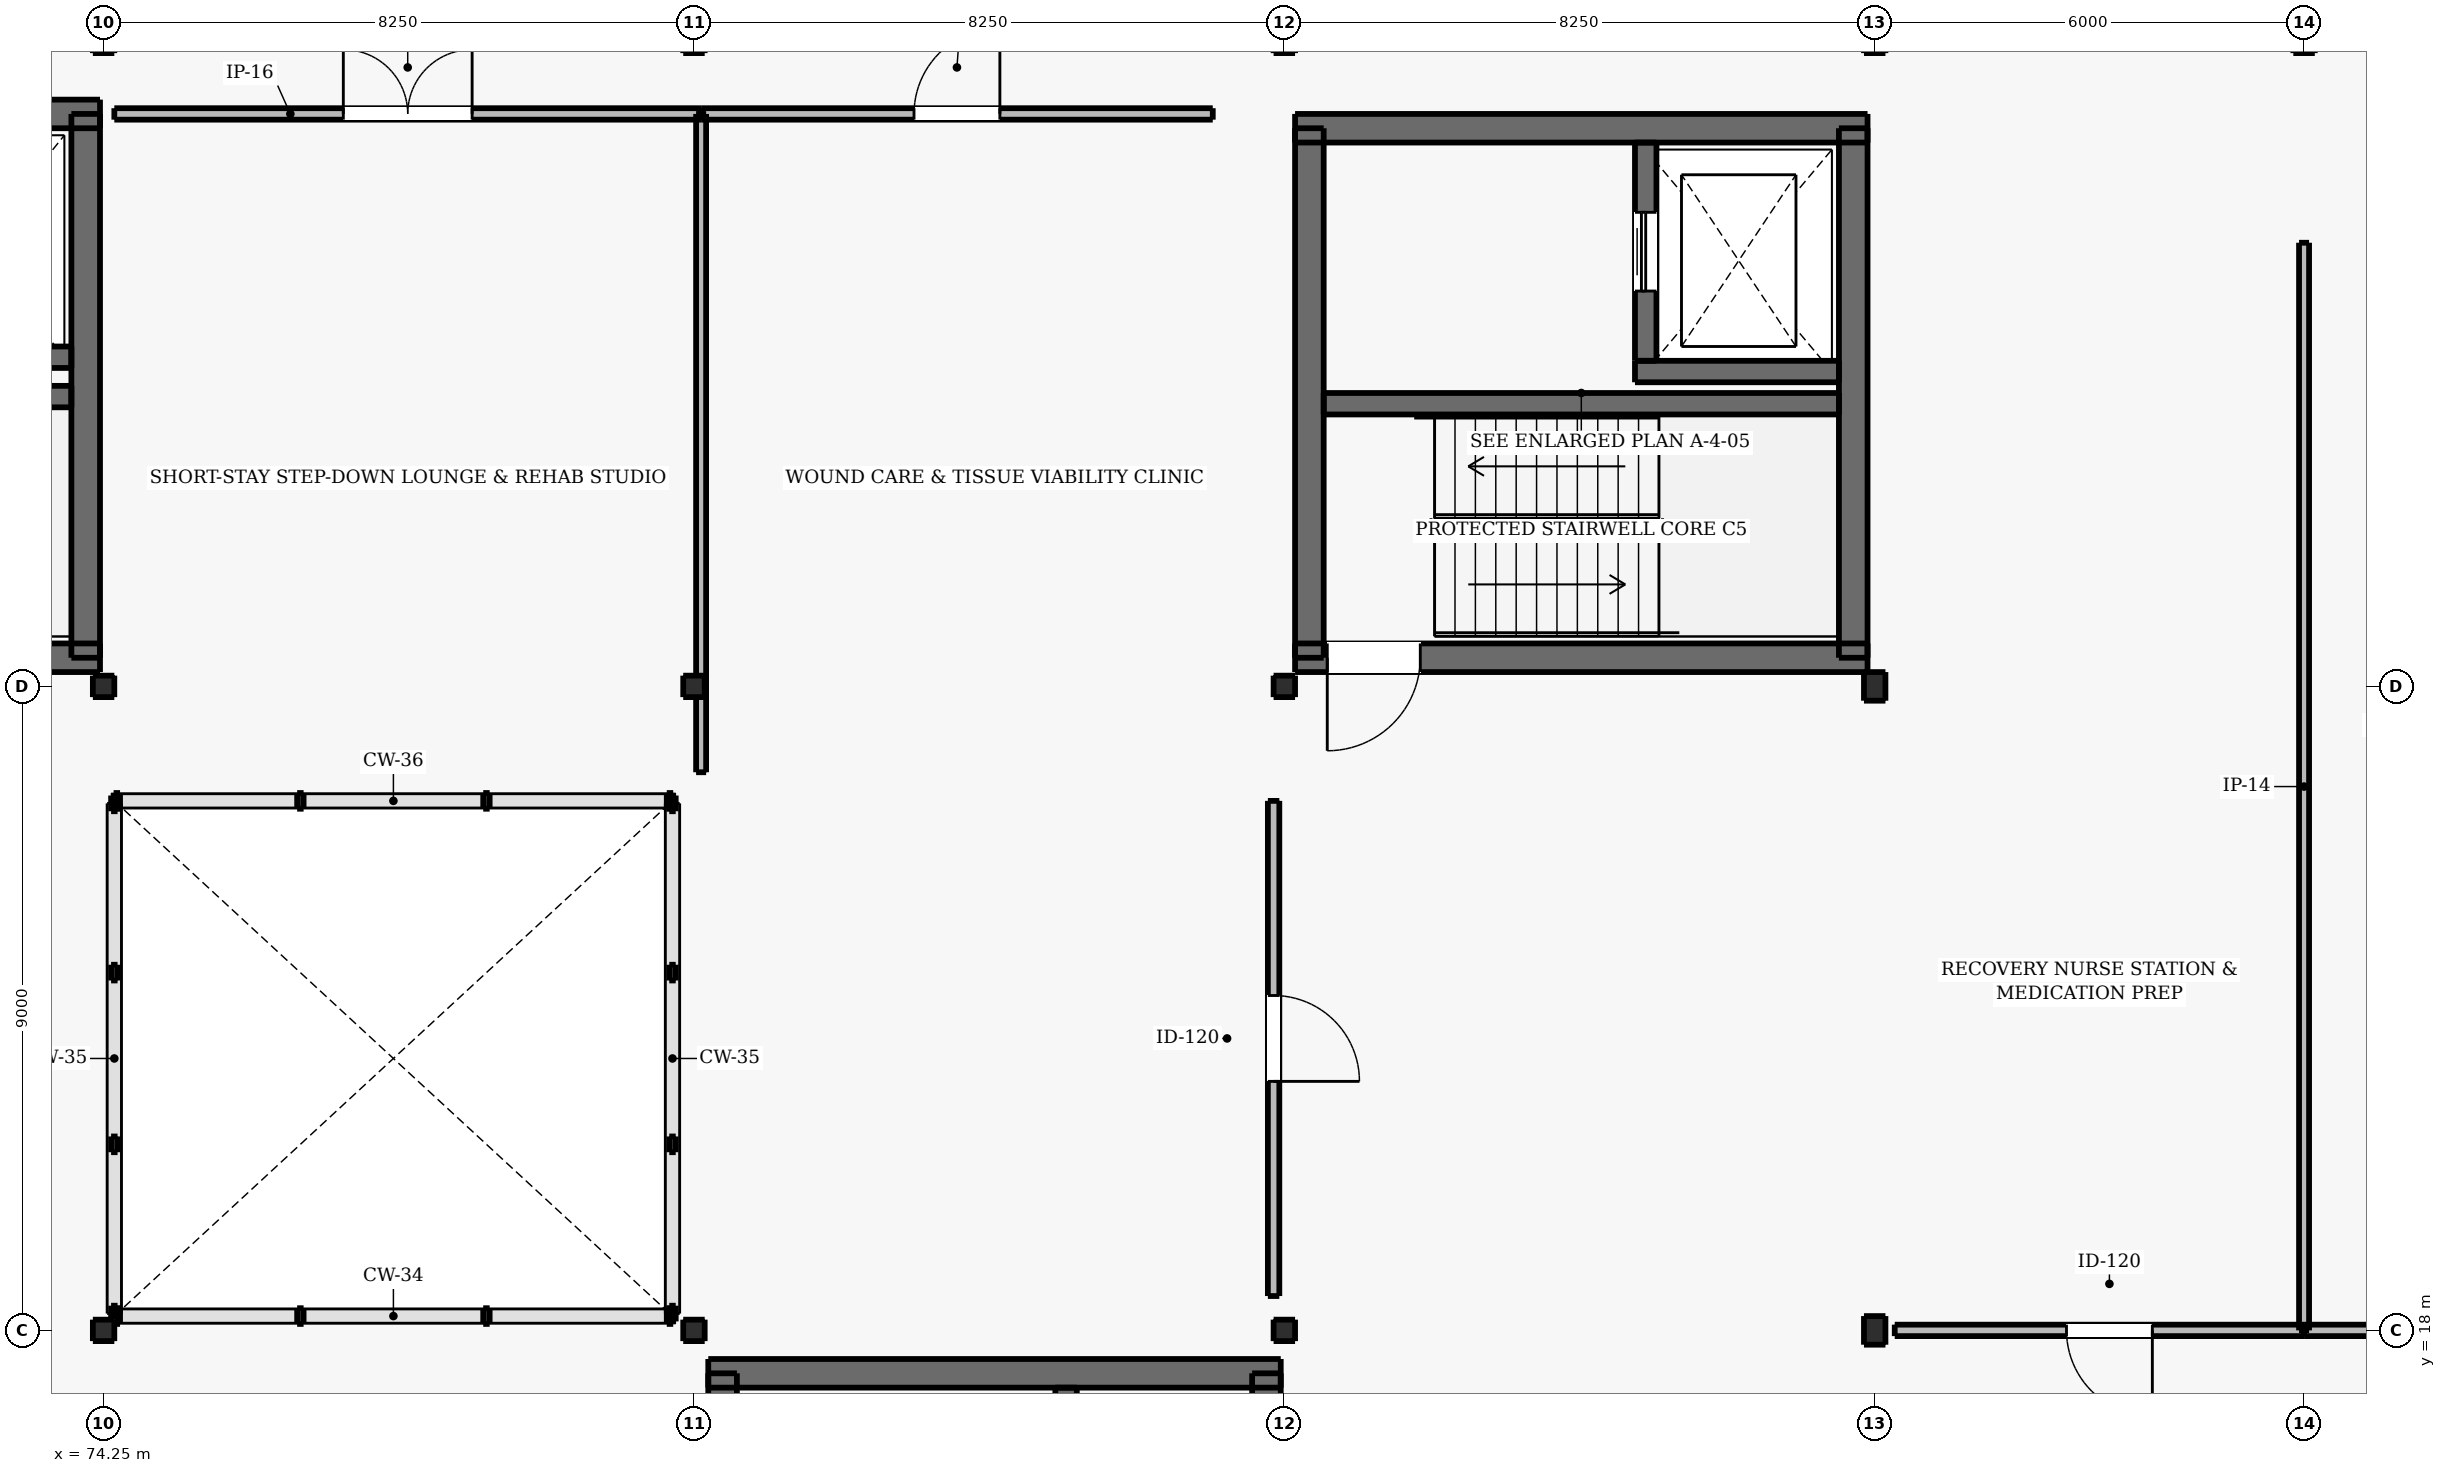
"""IFC4 building model, lengths in metres.
Left out: names, types, materials, properties, quantities, classifications, styles, units other than length and angle.
Written with IfcOpenShell. Run it as: python <this file> out.ifc"""

import sys

from ifc_helpers import new_model, si_unit, direction, frame, frame_2d, origin, origin_2d, place, context, subcontext, project, spatial, rectangle, i_section, extrude, element, fill, save


model = new_model("IFC4")
c1 = context("Model", 3, precision=1e-05, world=origin(), true_north=direction((0.0, 1.0)))
c2 = subcontext(c1, "Body", "Model", "MODEL_VIEW")
j1 = project(units=[si_unit("LENGTHUNIT", "METRE"), si_unit("PLANEANGLEUNIT", "RADIAN")], contexts=[c1])
p1 = place(None, origin())
s1 = spatial("IfcSite", under=j1, at=p1, CompositionType="ELEMENT")
p2 = place(p1, origin())
s2 = spatial("IfcBuilding", under=s1, at=p2, CompositionType="ELEMENT")
p3 = place(p2, frame((0.0, 0.0, 18.0)))
s3 = spatial("IfcBuildingStorey", under=s2, at=p3, CompositionType="ELEMENT", Elevation=18.0)
for number, where, z_axis, x_axis in (
    (1, (74.25, 18.0, 0.0), (0.0, 0.0, 1.0), (1.0, 0.0, 0.0)),
    (2, (74.25, 27.0, 0.0), (0.0, 0.0, 1.0), (1.0, 0.0, 0.0)),
    (3, (74.25, 36.0, 0.0), (0.0, 0.0, 1.0), (1.0, 0.0, 0.0)),
    (4, (82.5, 18.0, 0.0), (0.0, 0.0, 1.0), (1.0, 0.0, 0.0)),
    (5, (82.5, 27.0, 0.0), (0.0, 0.0, 1.0), (1.0, 0.0, 0.0)),
    (6, (82.5, 36.0, 0.0), (0.0, 0.0, 1.0), (1.0, 0.0, 0.0)),
    (7, (90.75, 18.0, 0.0), (0.0, 0.0, 1.0), (1.0, 0.0, 0.0)),
    (8, (90.75, 27.0, 0.0), (0.0, 0.0, 1.0), (1.0, 0.0, 0.0)),
    (9, (90.75, 36.0, 0.0), (0.0, 0.0, 1.0), (1.0, 0.0, 0.0)),
):
    element("IfcColumn", number, at=place(p3, frame(where, z_axis=z_axis, x_axis=x_axis)), inside=s3, PredefinedType="COLUMN", context=c2, shape_type="SweptSolid", body=[
        extrude(i_section(OverallWidth=0.3, OverallDepth=0.3, WebThickness=0.011, FlangeThickness=0.019, FilletRadius=0.027, at=origin_2d()), origin(), (0.0, 0.0, 1.0), 4.2),
    ])
for number, where, z_axis, x_axis in (
    (10, (99.0, 18.0, 0.0), (0.0, 0.0, 1.0), (1.0, 0.0, 0.0)),
    (11, (99.0, 27.0, 0.0), (0.0, 0.0, 1.0), (1.0, 0.0, 0.0)),
):
    element("IfcColumn", number, at=place(p3, frame(where, z_axis=z_axis, x_axis=x_axis)), inside=s3, PredefinedType="COLUMN", context=c2, shape_type="SweptSolid", body=[
        extrude(i_section(OverallWidth=0.3, OverallDepth=0.4, WebThickness=0.013, FlangeThickness=0.024, FilletRadius=0.027, at=origin_2d()), origin(), (0.0, 0.0, 1.0), 4.2),
    ])
for number, where, z_axis, x_axis in (
    (12, (99.0, 36.0, 0.0), (0.0, 0.0, 1.0), (1.0, 0.0, 0.0)),
    (13, (105.0, 36.0, 0.0), (0.0, 0.0, 1.0), (1.0, 0.0, 0.0)),
):
    element("IfcColumn", number, at=place(p3, frame(where, z_axis=z_axis, x_axis=x_axis)), inside=s3, PredefinedType="COLUMN", context=c2, shape_type="SweptSolid", body=[
        extrude(i_section(OverallWidth=0.3, OverallDepth=0.3, WebThickness=0.011, FlangeThickness=0.019, FilletRadius=0.027, at=origin_2d()), origin(), (0.0, 0.0, 1.0), 4.2),
    ])
p4 = place(p3, frame((66.2, 27.4, 0.0), z_axis=(0.0, 0.0, 1.0), x_axis=(1.0, 0.0, 0.0)))
e14 = element("IfcWall", 14, at=p4, inside=s3, PredefinedType="SHEAR", context=c2, shape_type="SweptSolid", body=[
    extrude(rectangle(XDim=8.0, YDim=0.4, at=frame_2d((4.0, 0.0))), origin(), (0.0, 0.0, 1.0), 4.2),
])
p5 = place(p4, frame((0.45, 0.0, 0.0)))
e15 = element("IfcOpeningElement", 15, at=p5, cuts=e14, PredefinedType="OPENING", context=c2, shape_type="SweptSolid", body=[
    extrude(rectangle(XDim=1.3, YDim=2.15, at=frame_2d((0.65, 1.075))), frame((0.0, 0.21, 0.0), z_axis=(0.0, -1.0, 0.0), x_axis=(1.0, 0.0, 0.0)), (0.0, 0.0, 1.0), 0.42),
])
p6 = place(p3, frame((66.2, 35.0, 0.0), z_axis=(0.0, 0.0, 1.0), x_axis=(1.0, 0.0, 0.0)))
e16 = element("IfcWall", 16, at=p6, inside=s3, PredefinedType="SHEAR", context=c2, shape_type="SweptSolid", body=[
    extrude(rectangle(XDim=8.0, YDim=0.4, at=frame_2d((4.0, 0.0))), origin(), (0.0, 0.0, 1.0), 4.2),
])
p7 = place(p3, frame((74.0, 27.4, 0.0), z_axis=(0.0, 0.0, 1.0), x_axis=(0.0, 1.0, 0.0)))
e17 = element("IfcWall", 17, at=p7, inside=s3, PredefinedType="SHEAR", context=c2, shape_type="SweptSolid", body=[
    extrude(rectangle(XDim=7.6, YDim=0.4, at=frame_2d((3.8, 0.0))), origin(), (0.0, 0.0, 1.0), 4.2),
])
p8 = place(p3, frame((66.6, 31.05, 0.0), z_axis=(0.0, 0.0, 1.0), x_axis=(1.0, 0.0, 0.0)))
e18 = element("IfcWall", 18, at=p8, inside=s3, PredefinedType="SHEAR", context=c2, shape_type="SweptSolid", body=[
    extrude(rectangle(XDim=7.2, YDim=0.3, at=frame_2d((3.6, 0.0))), origin(), (0.0, 0.0, 1.0), 4.2),
])
p9 = place(p3, frame((71.05, 31.6, 0.0), z_axis=(0.0, 0.0, 1.0), x_axis=(1.0, 0.0, 0.0)))
e19 = element("IfcWall", 19, at=p9, inside=s3, PredefinedType="SHEAR", context=c2, shape_type="SweptSolid", body=[
    extrude(rectangle(XDim=2.75, YDim=0.3, at=frame_2d((1.375, 0.0))), origin(), (0.0, 0.0, 1.0), 4.2),
])
p10 = place(p3, frame((82.7, 17.4, 0.0), z_axis=(0.0, 0.0, 1.0), x_axis=(1.0, 0.0, 0.0)))
e20 = element("IfcWall", 20, at=p10, inside=s3, PredefinedType="SHEAR", context=c2, shape_type="SweptSolid", body=[
    extrude(rectangle(XDim=8.0, YDim=0.4, at=frame_2d((4.0, 0.0))), origin(), (0.0, 0.0, 1.0), 4.2),
])
p11 = place(p3, frame((82.9, 9.8, 0.0), z_axis=(0.0, 0.0, 1.0), x_axis=(0.0, 1.0, 0.0)))
e21 = element("IfcWall", 21, at=p11, inside=s3, PredefinedType="SHEAR", context=c2, shape_type="SweptSolid", body=[
    extrude(rectangle(XDim=7.6, YDim=0.4, at=frame_2d((3.8, 0.0))), origin(), (0.0, 0.0, 1.0), 4.2),
])
p12 = place(p11, frame((5.09, 0.0, 0.0)))
e22 = element("IfcOpeningElement", 22, at=p12, cuts=e21, PredefinedType="OPENING", context=c2, shape_type="SweptSolid", body=[
    extrude(rectangle(XDim=1.12, YDim=2.15, at=frame_2d((0.56, 1.075))), frame((0.0, 0.21, 0.0), z_axis=(0.0, -1.0, 0.0), x_axis=(1.0, 0.0, 0.0)), (0.0, 0.0, 1.0), 0.42),
])
p13 = place(p3, frame((90.5, 9.8, 0.0), z_axis=(0.0, 0.0, 1.0), x_axis=(0.0, 1.0, 0.0)))
e23 = element("IfcWall", 23, at=p13, inside=s3, PredefinedType="SHEAR", context=c2, shape_type="SweptSolid", body=[
    extrude(rectangle(XDim=7.6, YDim=0.4, at=frame_2d((3.8, 0.0))), origin(), (0.0, 0.0, 1.0), 4.2),
])
p14 = place(p3, frame((87.7, 14.15, 0.0), z_axis=(0.0, 0.0, 1.0), x_axis=(0.0, 1.0, 0.0)))
e24 = element("IfcWall", 24, at=p14, inside=s3, PredefinedType="SHEAR", context=c2, shape_type="SweptSolid", body=[
    extrude(rectangle(XDim=3.05, YDim=0.3, at=frame_2d((1.525, 0.0))), origin(), (0.0, 0.0, 1.0), 4.2),
])
p15 = place(p14, frame((0.925, 0.0, 0.0)))
e25 = element("IfcOpeningElement", 25, at=p15, cuts=e24, PredefinedType="OPENING", context=c2, shape_type="SweptSolid", body=[
    extrude(rectangle(XDim=1.2, YDim=2.15, at=frame_2d((0.6, 1.075))), frame((0.0, 0.16, 0.0), z_axis=(0.0, -1.0, 0.0), x_axis=(1.0, 0.0, 0.0)), (0.0, 0.0, 1.0), 0.32),
])
p16 = place(p3, frame((90.9, 27.4, 0.0), z_axis=(0.0, 0.0, 1.0), x_axis=(1.0, 0.0, 0.0)))
e26 = element("IfcWall", 26, at=p16, inside=s3, PredefinedType="SHEAR", context=c2, shape_type="SweptSolid", body=[
    extrude(rectangle(XDim=8.0, YDim=0.4, at=frame_2d((4.0, 0.0))), origin(), (0.0, 0.0, 1.0), 4.2),
])
p17 = place(p16, frame((0.45, 0.0, 0.0)))
e27 = element("IfcOpeningElement", 27, at=p17, cuts=e26, PredefinedType="OPENING", context=c2, shape_type="SweptSolid", body=[
    extrude(rectangle(XDim=1.3, YDim=2.15, at=frame_2d((0.65, 1.075))), frame((0.0, 0.21, 0.0), z_axis=(0.0, -1.0, 0.0), x_axis=(1.0, 0.0, 0.0)), (0.0, 0.0, 1.0), 0.42),
])
p18 = place(p3, frame((90.9, 34.8, 0.0), z_axis=(0.0, 0.0, 1.0), x_axis=(1.0, 0.0, 0.0)))
e28 = element("IfcWall", 28, at=p18, inside=s3, PredefinedType="SHEAR", context=c2, shape_type="SweptSolid", body=[
    extrude(rectangle(XDim=8.0, YDim=0.4, at=frame_2d((4.0, 0.0))), origin(), (0.0, 0.0, 1.0), 4.2),
])
for number, where, z_axis, x_axis in (
    (29, (91.1, 27.4, 0.0), (0.0, 0.0, 1.0), (0.0, 1.0, 0.0)),
    (30, (98.7, 27.4, 0.0), (0.0, 0.0, 1.0), (0.0, 1.0, 0.0)),
):
    element("IfcWall", number, at=place(p3, frame(where, z_axis=z_axis, x_axis=x_axis)), inside=s3, PredefinedType="SHEAR", context=c2, shape_type="SweptSolid", body=[
        extrude(rectangle(XDim=7.4, YDim=0.4, at=frame_2d((3.7, 0.0))), origin(), (0.0, 0.0, 1.0), 4.2),
    ])
p19 = place(p3, frame((91.3, 30.95, 0.0), z_axis=(0.0, 0.0, 1.0), x_axis=(1.0, 0.0, 0.0)))
e31 = element("IfcWall", 31, at=p19, inside=s3, PredefinedType="SHEAR", context=c2, shape_type="SweptSolid", body=[
    extrude(rectangle(XDim=7.2, YDim=0.3, at=frame_2d((3.6, 0.0))), origin(), (0.0, 0.0, 1.0), 4.2),
])
p20 = place(p3, frame((95.65, 31.4, 0.0), z_axis=(0.0, 0.0, 1.0), x_axis=(1.0, 0.0, 0.0)))
e32 = element("IfcWall", 32, at=p20, inside=s3, PredefinedType="SHEAR", context=c2, shape_type="SweptSolid", body=[
    extrude(rectangle(XDim=2.85, YDim=0.3, at=frame_2d((1.425, 0.0))), origin(), (0.0, 0.0, 1.0), 4.2),
])
p21 = place(p3, frame((95.8, 31.55, 0.0), z_axis=(0.0, 0.0, 1.0), x_axis=(0.0, 1.0, 0.0)))
e33 = element("IfcWall", 33, at=p21, inside=s3, PredefinedType="SHEAR", context=c2, shape_type="SweptSolid", body=[
    extrude(rectangle(XDim=3.05, YDim=0.3, at=frame_2d((1.525, 0.0))), origin(), (0.0, 0.0, 1.0), 4.2),
])
p22 = place(p21, frame((0.975, 0.0, 0.0)))
e34 = element("IfcOpeningElement", 34, at=p22, cuts=e33, PredefinedType="OPENING", context=c2, shape_type="SweptSolid", body=[
    extrude(rectangle(XDim=1.1, YDim=2.15, at=frame_2d((0.55, 1.075))), frame((0.0, 0.16, 0.0), z_axis=(0.0, -1.0, 0.0), x_axis=(1.0, 0.0, 0.0)), (0.0, 0.0, 1.0), 0.32),
])
p23 = place(p3, frame((99.28, 18.0, 0.0), z_axis=(0.0, 0.0, 1.0), x_axis=(1.0, 0.0, 0.0)))
e35 = element("IfcWall", 35, at=p23, inside=s3, PredefinedType="PARTITIONING", context=c2, shape_type="SweptSolid", body=[
    extrude(rectangle(XDim=5.72, YDim=0.16, at=frame_2d((2.86, 0.0))), origin(), (0.0, 0.0, 1.0), 3.44),
])
p24 = place(p23, frame((2.4, 0.0, 0.0)))
e36 = element("IfcOpeningElement", 36, at=p24, cuts=e35, PredefinedType="OPENING", context=c2, shape_type="SweptSolid", body=[
    extrude(rectangle(XDim=1.2, YDim=2.2, at=frame_2d((0.6, 1.1))), frame((0.0, 0.09, 0.0), z_axis=(0.0, -1.0, 0.0), x_axis=(1.0, 0.0, 0.0)), (0.0, 0.0, 1.0), 0.18),
])
p25 = place(p3, frame((105.0, 18.0, 0.0), z_axis=(0.0, 0.0, 1.0), x_axis=(0.0, 1.0, 0.0)))
e37 = element("IfcWall", 37, at=p25, inside=s3, PredefinedType="PARTITIONING", context=c2, shape_type="SweptSolid", body=[
    extrude(rectangle(XDim=15.2, YDim=0.14, at=frame_2d((7.6, 0.0))), origin(), (0.0, 0.0, 1.0), 3.92),
])
p26 = place(p3, frame((105.0, 18.0, 0.0), z_axis=(0.0, 0.0, 1.0), x_axis=(1.0, 0.0, 0.0)))
e38 = element("IfcWall", 38, at=p26, inside=s3, PredefinedType="PARTITIONING", context=c2, shape_type="SweptSolid", body=[
    extrude(rectangle(XDim=5.5, YDim=0.16, at=frame_2d((2.75, 0.0))), origin(), (0.0, 0.0, 1.0), 3.44),
])
p27 = place(p26, frame((2.2, 0.0, 0.0)))
e39 = element("IfcOpeningElement", 39, at=p27, cuts=e38, PredefinedType="OPENING", context=c2, shape_type="SweptSolid", body=[
    extrude(rectangle(XDim=1.1, YDim=2.15, at=frame_2d((0.55, 1.075))), frame((0.0, 0.09, 0.0), z_axis=(0.0, -1.0, 0.0), x_axis=(1.0, 0.0, 0.0)), (0.0, 0.0, 1.0), 0.18),
])
p28 = place(p3, frame((74.4, 35.0, 0.0), z_axis=(0.0, 0.0, 1.0), x_axis=(1.0, 0.0, 0.0)))
e40 = element("IfcWall", 40, at=p28, inside=s3, PredefinedType="PARTITIONING", context=c2, shape_type="SweptSolid", body=[
    extrude(rectangle(XDim=8.2, YDim=0.16, at=frame_2d((4.1, 0.0))), origin(), (0.0, 0.0, 1.0), 3.92),
])
p29 = place(p28, frame((3.2, 0.0, 0.0)))
e41 = element("IfcOpeningElement", 41, at=p29, cuts=e40, PredefinedType="OPENING", context=c2, shape_type="SweptSolid", body=[
    extrude(rectangle(XDim=1.8, YDim=2.25, at=frame_2d((0.9, 1.125))), frame((0.0, 0.09, 0.0), z_axis=(0.0, -1.0, 0.0), x_axis=(1.0, 0.0, 0.0)), (0.0, 0.0, 1.0), 0.18),
])
p30 = place(p3, frame((82.6, 25.8, 0.0), z_axis=(0.0, 0.0, 1.0), x_axis=(0.0, 1.0, 0.0)))
e42 = element("IfcWall", 42, at=p30, inside=s3, PredefinedType="PARTITIONING", context=c2, shape_type="SweptSolid", body=[
    extrude(rectangle(XDim=9.2, YDim=0.14, at=frame_2d((4.6, 0.0))), origin(), (0.0, 0.0, 1.0), 3.49),
])
p31 = place(p3, frame((82.6, 35.0, 0.0), z_axis=(0.0, 0.0, 1.0), x_axis=(1.0, 0.0, 0.0)))
e43 = element("IfcWall", 43, at=p31, inside=s3, PredefinedType="PARTITIONING", context=c2, shape_type="SweptSolid", body=[
    extrude(rectangle(XDim=7.15, YDim=0.16, at=frame_2d((3.575, 0.0))), origin(), (0.0, 0.0, 1.0), 3.92),
])
p32 = place(p31, frame((2.975, 0.0, 0.0)))
e44 = element("IfcOpeningElement", 44, at=p32, cuts=e43, PredefinedType="OPENING", context=c2, shape_type="SweptSolid", body=[
    extrude(rectangle(XDim=1.2, YDim=2.2, at=frame_2d((0.6, 1.1))), frame((0.0, 0.09, 0.0), z_axis=(0.0, -1.0, 0.0), x_axis=(1.0, 0.0, 0.0)), (0.0, 0.0, 1.0), 0.18),
])
p33 = place(p3, frame((90.6, 18.48, 0.0), z_axis=(0.0, 0.0, 1.0), x_axis=(0.0, 1.0, 0.0)))
e45 = element("IfcWall", 45, at=p33, inside=s3, PredefinedType="PARTITIONING", context=c2, shape_type="SweptSolid", body=[
    extrude(rectangle(XDim=6.92, YDim=0.16, at=frame_2d((3.46, 0.0))), origin(), (0.0, 0.0, 1.0), 3.49),
])
p34 = place(p33, frame((3.0, 0.0, 0.0)))
e46 = element("IfcOpeningElement", 46, at=p34, cuts=e45, PredefinedType="OPENING", context=c2, shape_type="SweptSolid", body=[
    extrude(rectangle(XDim=1.2, YDim=2.2, at=frame_2d((0.6, 1.1))), frame((0.0, 0.09, 0.0), z_axis=(0.0, -1.0, 0.0), x_axis=(1.0, 0.0, 0.0)), (0.0, 0.0, 1.0), 0.18),
])
p35 = place(p22, origin())
e47 = element("IfcDoor", 47, at=p35, inside=s3, OperationType="DOUBLE_DOOR_SLIDING", PredefinedType="DOOR", context=c2, shape_type="SweptSolid", body=[
    extrude(rectangle(XDim=1.1, YDim=2.15, at=frame_2d((0.55, 1.075))), frame((0.0, 0.025, 0.0), z_axis=(0.0, -1.0, 0.0), x_axis=(1.0, 0.0, 0.0)), (0.0, 0.0, 1.0), 0.05),
])
fill(e34, e47)
p36 = place(p17, frame((1.3, 0.0, 0.0), z_axis=(0.0, 0.0, 1.0), x_axis=(-1.0, 0.0, 0.0)))
e48 = element("IfcDoor", 48, at=p36, inside=s3, OperationType="SINGLE_SWING_LEFT", PredefinedType="DOOR", context=c2, shape_type="SweptSolid", body=[
    extrude(rectangle(XDim=1.3, YDim=2.15, at=frame_2d((0.65, 1.075))), frame((0.0, 0.025, 0.0), z_axis=(0.0, -1.0, 0.0), x_axis=(1.0, 0.0, 0.0)), (0.0, 0.0, 1.0), 0.05),
])
fill(e27, e48)
p37 = place(p24, frame((1.2, 0.0, 0.0), z_axis=(0.0, 0.0, 1.0), x_axis=(-1.0, 0.0, 0.0)))
e49 = element("IfcDoor", 49, at=p37, inside=s3, OperationType="SINGLE_SWING_RIGHT", PredefinedType="DOOR", context=c2, shape_type="SweptSolid", body=[
    extrude(rectangle(XDim=1.2, YDim=2.2, at=frame_2d((0.6, 1.1))), frame((0.0, 0.025, 0.0), z_axis=(0.0, -1.0, 0.0), x_axis=(1.0, 0.0, 0.0)), (0.0, 0.0, 1.0), 0.05),
])
fill(e36, e49)
p38 = place(p29, origin())
e50 = element("IfcDoor", 50, at=p38, inside=s3, OperationType="DOUBLE_DOOR_SINGLE_SWING", PredefinedType="DOOR", context=c2, shape_type="SweptSolid", body=[
    extrude(rectangle(XDim=1.8, YDim=2.25, at=frame_2d((0.9, 1.125))), frame((0.0, 0.025, 0.0), z_axis=(0.0, -1.0, 0.0), x_axis=(1.0, 0.0, 0.0)), (0.0, 0.0, 1.0), 0.05),
])
fill(e41, e50)
p39 = place(p32, origin())
e51 = element("IfcDoor", 51, at=p39, inside=s3, OperationType="SINGLE_SWING_RIGHT", PredefinedType="DOOR", context=c2, shape_type="SweptSolid", body=[
    extrude(rectangle(XDim=1.2, YDim=2.2, at=frame_2d((0.6, 1.1))), frame((0.0, 0.025, 0.0), z_axis=(0.0, -1.0, 0.0), x_axis=(1.0, 0.0, 0.0)), (0.0, 0.0, 1.0), 0.05),
])
fill(e44, e51)
p40 = place(p34, frame((1.2, 0.0, 0.0), z_axis=(0.0, 0.0, 1.0), x_axis=(-1.0, 0.0, 0.0)))
e52 = element("IfcDoor", 52, at=p40, inside=s3, OperationType="SINGLE_SWING_LEFT", PredefinedType="DOOR", context=c2, shape_type="SweptSolid", body=[
    extrude(rectangle(XDim=1.2, YDim=2.2, at=frame_2d((0.6, 1.1))), frame((0.0, 0.025, 0.0), z_axis=(0.0, -1.0, 0.0), x_axis=(1.0, 0.0, 0.0)), (0.0, 0.0, 1.0), 0.05),
])
fill(e46, e52)
save(model, sys.argv[1])
